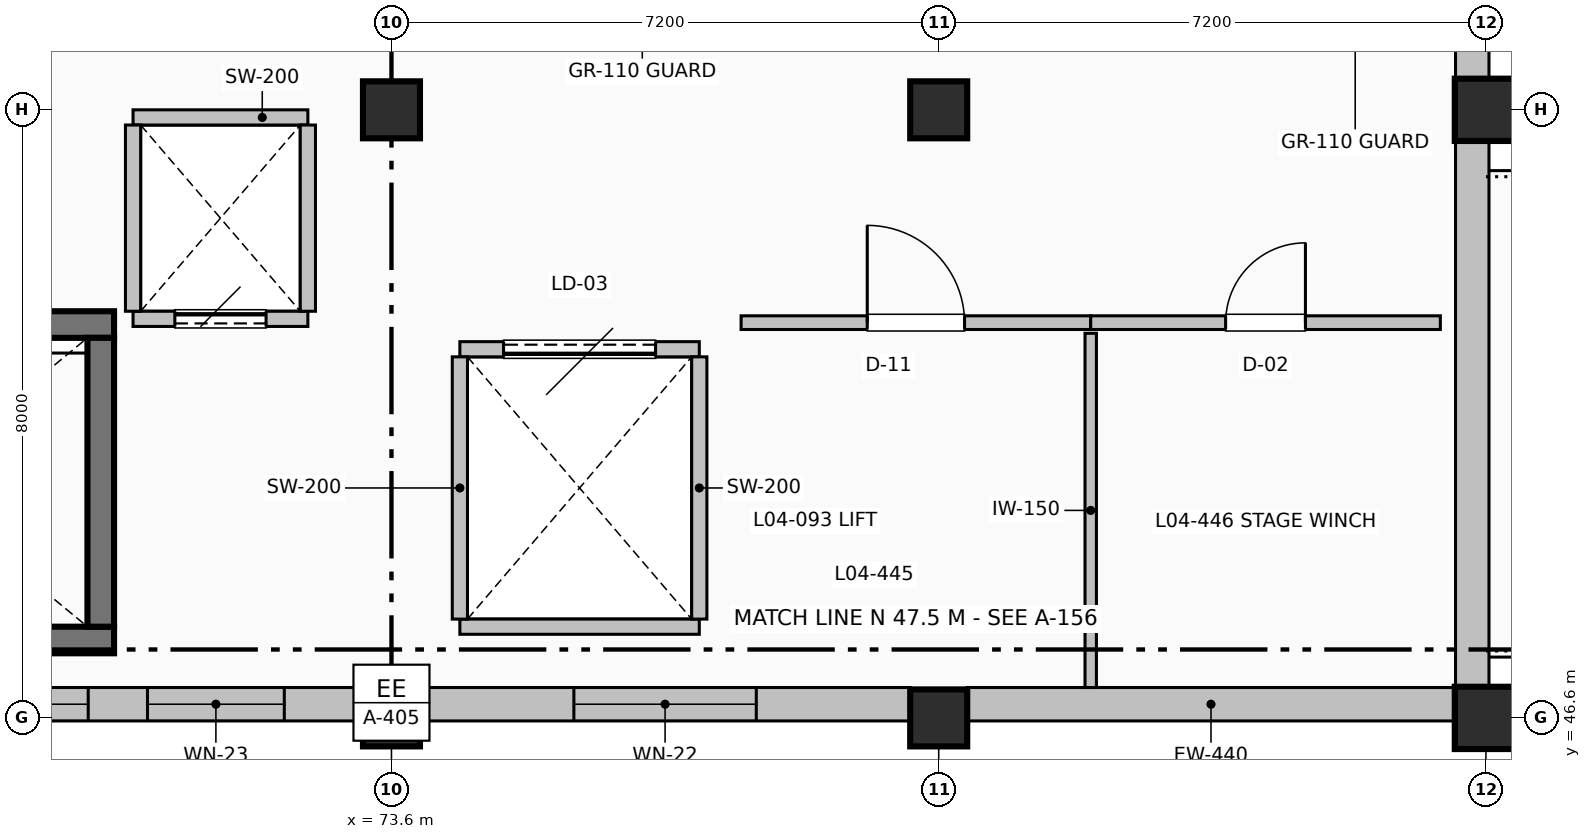
"""IFC4 building model, lengths in metres.
Left out: names, types, materials, properties, quantities, classifications, styles, units other than length and angle.
Written with IfcOpenShell. Run it as: python <this file> out.ifc"""

import sys

from ifc_helpers import new_model, si_unit, direction, frame, frame_2d, origin, origin_2d, place, context, subcontext, project, spatial, rectangle, extrude, element, fill, save


model = new_model("IFC4")
c1 = context("Model", 3, precision=1e-05, world=origin(), true_north=direction((0.0, 1.0)))
c2 = subcontext(c1, "Body", "Model", "MODEL_VIEW")
j1 = project(units=[si_unit("LENGTHUNIT", "METRE"), si_unit("PLANEANGLEUNIT", "RADIAN")], contexts=[c1])
p1 = place(None, origin())
s1 = spatial("IfcSite", under=j1, at=p1, CompositionType="ELEMENT")
p2 = place(p1, origin())
s2 = spatial("IfcBuilding", under=s1, at=p2, CompositionType="ELEMENT")
p3 = place(p2, frame((0.0, 0.0, 19.5)))
s3 = spatial("IfcBuildingStorey", under=s2, at=p3, CompositionType="ELEMENT", Elevation=19.5)
for number, where, z_axis, x_axis in (
    (1, (73.6, 46.6, 0.0), (0.0, 0.0, 1.0), (1.0, 0.0, 0.0)),
    (2, (73.6, 54.6, 0.0), (0.0, 0.0, 1.0), (1.0, 0.0, 0.0)),
    (3, (80.8, 46.6, 0.0), (0.0, 0.0, 1.0), (1.0, 0.0, 0.0)),
    (4, (80.8, 54.6, 0.0), (0.0, 0.0, 1.0), (1.0, 0.0, 0.0)),
):
    element("IfcColumn", number, at=place(p3, frame(where, z_axis=z_axis, x_axis=x_axis)), inside=s3, PredefinedType="COLUMN", context=c2, shape_type="SweptSolid", body=[
        extrude(rectangle(XDim=0.75, YDim=0.75, at=origin_2d()), origin(), (0.0, 0.0, 1.0), 4.5),
    ])
for number, where, z_axis, x_axis in (
    (5, (88.0, 46.6, 0.0), (0.0, 0.0, 1.0), (1.0, 0.0, 0.0)),
    (6, (88.0, 54.6, 0.0), (0.0, 0.0, 1.0), (1.0, 0.0, 0.0)),
):
    element("IfcColumn", number, at=place(p3, frame(where, z_axis=z_axis, x_axis=x_axis)), inside=s3, PredefinedType="COLUMN", context=c2, shape_type="SweptSolid", body=[
        extrude(rectangle(XDim=0.82, YDim=0.82, at=origin_2d()), origin(), (0.0, 0.0, 1.0), 4.5),
    ])
for number, where, z_axis, x_axis in (
    (7, (61.45, 47.625, 0.0), (0.0, 0.0, 1.0), (1.0, 0.0, 0.0)),
    (8, (69.95, 51.775, 0.0), (0.0, 0.0, 1.0), (-1.0, 0.0, 0.0)),
):
    element("IfcWall", number, at=place(p3, frame(where, z_axis=z_axis, x_axis=x_axis)), inside=s3, PredefinedType="SHEAR", context=c2, shape_type="SweptSolid", body=[
        extrude(rectangle(XDim=8.5, YDim=0.35, at=frame_2d((4.25, 0.0))), origin(), (0.0, 0.0, 1.0), 4.22),
    ])
p4 = place(p3, frame((69.775, 51.6, 0.0), z_axis=(0.0, 0.0, 1.0), x_axis=(0.0, -1.0, 0.0)))
e9 = element("IfcWall", 9, at=p4, inside=s3, PredefinedType="SHEAR", context=c2, shape_type="SweptSolid", body=[
    extrude(rectangle(XDim=3.8, YDim=0.35, at=frame_2d((1.9, 0.0))), origin(), (0.0, 0.0, 1.0), 4.22),
])
p5 = place(p3, frame((87.82, 62.09, 0.0), z_axis=(0.0, 0.0, 1.0), x_axis=(0.0, -1.0, 0.0)))
e10 = element("IfcWall", 10, at=p5, inside=s3, PredefinedType="SOLIDWALL", context=c2, shape_type="SweptSolid", body=[
    extrude(rectangle(XDim=7.08, YDim=0.44, at=frame_2d((3.54, 0.0))), origin(), (0.0, 0.0, 1.0), 3.462),
])
p6 = place(p3, frame((87.82, 54.19, 0.0), z_axis=(0.0, 0.0, 1.0), x_axis=(0.0, -1.0, 0.0)))
e11 = element("IfcWall", 11, at=p6, inside=s3, PredefinedType="SOLIDWALL", context=c2, shape_type="SweptSolid", body=[
    extrude(rectangle(XDim=7.18, YDim=0.44, at=frame_2d((3.59, 0.0))), origin(), (0.0, 0.0, 1.0), 3.462),
])
p7 = place(p3, frame((87.59, 46.78, 0.0), z_axis=(0.0, 0.0, 1.0), x_axis=(-1.0, 0.0, 0.0)))
e12 = element("IfcWall", 12, at=p7, inside=s3, PredefinedType="SOLIDWALL", context=c2, shape_type="SweptSolid", body=[
    extrude(rectangle(XDim=6.415, YDim=0.44, at=frame_2d((3.208, 0.0))), origin(), (0.0, 0.0, 1.0), 3.462),
])
p8 = place(p3, frame((80.425, 46.78, 0.0), z_axis=(0.0, 0.0, 1.0), x_axis=(-1.0, 0.0, 0.0)))
e13 = element("IfcWall", 13, at=p8, inside=s3, PredefinedType="SOLIDWALL", context=c2, shape_type="SweptSolid", body=[
    extrude(rectangle(XDim=6.45, YDim=0.44, at=frame_2d((3.225, 0.0))), origin(), (0.0, 0.0, 1.0), 3.462),
])
p9 = place(p8, frame((2.025, 0.0, 1.05)))
e14 = element("IfcOpeningElement", 14, at=p9, cuts=e13, PredefinedType="OPENING", context=c2, shape_type="SweptSolid", body=[
    extrude(rectangle(XDim=2.4, YDim=1.25, at=frame_2d((1.2, 0.625))), frame((0.0, 0.23, 0.0), z_axis=(0.0, -1.0, 0.0), x_axis=(1.0, 0.0, 0.0)), (0.0, 0.0, 1.0), 0.46),
])
p10 = place(p3, frame((73.225, 46.78, 0.0), z_axis=(0.0, 0.0, 1.0), x_axis=(-1.0, 0.0, 0.0)))
e15 = element("IfcWall", 15, at=p10, inside=s3, PredefinedType="SOLIDWALL", context=c2, shape_type="SweptSolid", body=[
    extrude(rectangle(XDim=6.45, YDim=0.44, at=frame_2d((3.225, 0.0))), origin(), (0.0, 0.0, 1.0), 3.462),
])
p11 = place(p10, frame((1.035, 0.0, 1.05)))
e16 = element("IfcOpeningElement", 16, at=p11, cuts=e15, PredefinedType="OPENING", context=c2, shape_type="SweptSolid", body=[
    extrude(rectangle(XDim=1.8, YDim=1.25, at=frame_2d((0.9, 0.625))), frame((0.0, 0.23, 0.0), z_axis=(0.0, -1.0, 0.0), x_axis=(1.0, 0.0, 0.0)), (0.0, 0.0, 1.0), 0.46),
])
p12 = place(p10, frame((3.615, 0.0, 1.05)))
e17 = element("IfcOpeningElement", 17, at=p12, cuts=e15, PredefinedType="OPENING", context=c2, shape_type="SweptSolid", body=[
    extrude(rectangle(XDim=1.8, YDim=1.25, at=frame_2d((0.9, 0.625))), frame((0.0, 0.23, 0.0), z_axis=(0.0, -1.0, 0.0), x_axis=(1.0, 0.0, 0.0)), (0.0, 0.0, 1.0), 0.46),
])
p13 = place(p3, frame((70.2, 51.85, 0.0), z_axis=(0.0, 0.0, 1.0), x_axis=(1.0, 0.0, 0.0)))
e18 = element("IfcWall", 18, at=p13, inside=s3, PredefinedType="PARTITIONING", context=c2, shape_type="SweptSolid", body=[
    extrude(rectangle(XDim=2.3, YDim=0.2, at=frame_2d((1.15, 0.0))), origin(), (0.0, 0.0, 1.0), 4.192),
])
p14 = place(p13, frame((0.55, 0.0, 0.0)))
e19 = element("IfcOpeningElement", 19, at=p14, cuts=e18, PredefinedType="OPENING", context=c2, shape_type="SweptSolid", body=[
    extrude(rectangle(XDim=1.2, YDim=2.15, at=frame_2d((0.6, 1.075))), frame((0.0, 0.11, 0.0), z_axis=(0.0, -1.0, 0.0), x_axis=(1.0, 0.0, 0.0)), (0.0, 0.0, 1.0), 0.22),
])
p15 = place(p3, frame((72.5, 54.5, 0.0), z_axis=(0.0, 0.0, 1.0), x_axis=(-1.0, 0.0, 0.0)))
e20 = element("IfcWall", 20, at=p15, inside=s3, PredefinedType="PARTITIONING", context=c2, shape_type="SweptSolid", body=[
    extrude(rectangle(XDim=2.3, YDim=0.2, at=frame_2d((1.15, 0.0))), origin(), (0.0, 0.0, 1.0), 3.462),
])
for number, where, z_axis, x_axis in (
    (21, (70.2, 51.95, 0.0), (0.0, 0.0, 1.0), (0.0, 1.0, 0.0)),
    (22, (72.5, 54.4, 0.0), (0.0, 0.0, 1.0), (0.0, -1.0, 0.0)),
):
    element("IfcWall", number, at=place(p3, frame(where, z_axis=z_axis, x_axis=x_axis)), inside=s3, PredefinedType="PARTITIONING", context=c2, shape_type="SweptSolid", body=[
        extrude(rectangle(XDim=2.45, YDim=0.2, at=frame_2d((1.225, 0.0))), origin(), (0.0, 0.0, 1.0), 4.192),
    ])
p16 = place(p3, frame((74.5, 47.8, 0.0), z_axis=(0.0, 0.0, 1.0), x_axis=(1.0, 0.0, 0.0)))
e23 = element("IfcWall", 23, at=p16, inside=s3, PredefinedType="PARTITIONING", context=c2, shape_type="SweptSolid", body=[
    extrude(rectangle(XDim=3.15, YDim=0.2, at=frame_2d((1.575, 0.0))), origin(), (0.0, 0.0, 1.0), 4.192),
])
p17 = place(p3, frame((77.65, 51.45, 0.0), z_axis=(0.0, 0.0, 1.0), x_axis=(-1.0, 0.0, 0.0)))
e24 = element("IfcWall", 24, at=p17, inside=s3, PredefinedType="PARTITIONING", context=c2, shape_type="SweptSolid", body=[
    extrude(rectangle(XDim=3.15, YDim=0.2, at=frame_2d((1.575, 0.0))), origin(), (0.0, 0.0, 1.0), 4.192),
])
p18 = place(p17, frame((0.575, 0.0, 0.0)))
e25 = element("IfcOpeningElement", 25, at=p18, cuts=e24, PredefinedType="OPENING", context=c2, shape_type="SweptSolid", body=[
    extrude(rectangle(XDim=2.0, YDim=2.35, at=frame_2d((1.0, 1.175))), frame((0.0, 0.11, 0.0), z_axis=(0.0, -1.0, 0.0), x_axis=(1.0, 0.0, 0.0)), (0.0, 0.0, 1.0), 0.22),
])
for number, where, z_axis, x_axis in (
    (26, (74.5, 47.9, 0.0), (0.0, 0.0, 1.0), (0.0, 1.0, 0.0)),
    (27, (77.65, 51.35, 0.0), (0.0, 0.0, 1.0), (0.0, -1.0, 0.0)),
):
    element("IfcWall", number, at=place(p3, frame(where, z_axis=z_axis, x_axis=x_axis)), inside=s3, PredefinedType="PARTITIONING", context=c2, shape_type="SweptSolid", body=[
        extrude(rectangle(XDim=3.45, YDim=0.2, at=frame_2d((1.725, 0.0))), origin(), (0.0, 0.0, 1.0), 4.192),
    ])
p19 = place(p3, frame((78.2, 51.8, 0.0), z_axis=(0.0, 0.0, 1.0), x_axis=(1.0, 0.0, 0.0)))
e28 = element("IfcWall", 28, at=p19, inside=s3, PredefinedType="PARTITIONING", context=c2, shape_type="SweptSolid", body=[
    extrude(rectangle(XDim=4.6, YDim=0.18, at=frame_2d((2.3, 0.0))), origin(), (0.0, 0.0, 1.0), 4.192),
])
p20 = place(p19, frame((1.66, 0.0, 0.0)))
e29 = element("IfcOpeningElement", 29, at=p20, cuts=e28, PredefinedType="OPENING", context=c2, shape_type="SweptSolid", body=[
    extrude(rectangle(XDim=1.28, YDim=2.14, at=frame_2d((0.64, 1.07))), frame((0.0, 0.1, 0.0), z_axis=(0.0, -1.0, 0.0), x_axis=(1.0, 0.0, 0.0)), (0.0, 0.0, 1.0), 0.2),
])
p21 = place(p3, frame((82.8, 47.0, 0.0), z_axis=(0.0, 0.0, 1.0), x_axis=(0.0, 1.0, 0.0)))
e30 = element("IfcWall", 30, at=p21, inside=s3, PredefinedType="PARTITIONING", context=c2, shape_type="SweptSolid", body=[
    extrude(rectangle(XDim=4.66, YDim=0.15, at=frame_2d((2.33, 0.0))), origin(), (0.0, 0.0, 1.0), 4.192),
])
p22 = place(p3, frame((82.8, 51.8, 0.0), z_axis=(0.0, 0.0, 1.0), x_axis=(1.0, 0.0, 0.0)))
e31 = element("IfcWall", 31, at=p22, inside=s3, PredefinedType="PARTITIONING", context=c2, shape_type="SweptSolid", body=[
    extrude(rectangle(XDim=4.6, YDim=0.18, at=frame_2d((2.3, 0.0))), origin(), (0.0, 0.0, 1.0), 4.192),
])
p23 = place(p22, frame((1.775, 0.0, 0.0)))
e32 = element("IfcOpeningElement", 32, at=p23, cuts=e31, PredefinedType="OPENING", context=c2, shape_type="SweptSolid", body=[
    extrude(rectangle(XDim=1.05, YDim=2.1, at=frame_2d((0.525, 1.05))), frame((0.0, 0.1, 0.0), z_axis=(0.0, -1.0, 0.0), x_axis=(1.0, 0.0, 0.0)), (0.0, 0.0, 1.0), 0.2),
])
p24 = place(p9, origin())
e33 = element("IfcWindow", 33, at=p24, inside=s3, PartitioningType="SINGLE_PANEL", PredefinedType="WINDOW", context=c2, shape_type="SweptSolid", body=[
    extrude(rectangle(XDim=2.4, YDim=1.25, at=frame_2d((1.2, 0.625))), frame((0.0, 0.03, 0.0), z_axis=(0.0, -1.0, 0.0), x_axis=(1.0, 0.0, 0.0)), (0.0, 0.0, 1.0), 0.06),
])
fill(e14, e33)
p25 = place(p11, origin())
e34 = element("IfcWindow", 34, at=p25, inside=s3, PartitioningType="SINGLE_PANEL", PredefinedType="WINDOW", context=c2, shape_type="SweptSolid", body=[
    extrude(rectangle(XDim=1.8, YDim=1.25, at=frame_2d((0.9, 0.625))), frame((0.0, 0.03, 0.0), z_axis=(0.0, -1.0, 0.0), x_axis=(1.0, 0.0, 0.0)), (0.0, 0.0, 1.0), 0.06),
])
fill(e16, e34)
p26 = place(p12, origin())
e35 = element("IfcWindow", 35, at=p26, inside=s3, PartitioningType="SINGLE_PANEL", PredefinedType="WINDOW", context=c2, shape_type="SweptSolid", body=[
    extrude(rectangle(XDim=1.8, YDim=1.25, at=frame_2d((0.9, 0.625))), frame((0.0, 0.03, 0.0), z_axis=(0.0, -1.0, 0.0), x_axis=(1.0, 0.0, 0.0)), (0.0, 0.0, 1.0), 0.06),
])
fill(e17, e35)
p27 = place(p14, origin())
e36 = element("IfcDoor", 36, at=p27, inside=s3, OperationType="SLIDING_TO_LEFT", PredefinedType="DOOR", context=c2, shape_type="SweptSolid", body=[
    extrude(rectangle(XDim=1.2, YDim=2.15, at=frame_2d((0.6, 1.075))), frame((0.0, 0.025, 0.0), z_axis=(0.0, -1.0, 0.0), x_axis=(1.0, 0.0, 0.0)), (0.0, 0.0, 1.0), 0.05),
])
fill(e19, e36)
p28 = place(p18, origin())
e37 = element("IfcDoor", 37, at=p28, inside=s3, OperationType="SLIDING_TO_LEFT", PredefinedType="DOOR", context=c2, shape_type="SweptSolid", body=[
    extrude(rectangle(XDim=2.0, YDim=2.35, at=frame_2d((1.0, 1.175))), frame((0.0, 0.025, 0.0), z_axis=(0.0, -1.0, 0.0), x_axis=(1.0, 0.0, 0.0)), (0.0, 0.0, 1.0), 0.05),
])
fill(e25, e37)
p29 = place(p20, origin())
e38 = element("IfcDoor", 38, at=p29, inside=s3, OperationType="SINGLE_SWING_LEFT", PredefinedType="DOOR", context=c2, shape_type="SweptSolid", body=[
    extrude(rectangle(XDim=1.28, YDim=2.14, at=frame_2d((0.64, 1.07))), frame((0.0, 0.025, 0.0), z_axis=(0.0, -1.0, 0.0), x_axis=(1.0, 0.0, 0.0)), (0.0, 0.0, 1.0), 0.05),
])
fill(e29, e38)
p30 = place(p23, origin())
e39 = element("IfcDoor", 39, at=p30, inside=s3, OperationType="SINGLE_SWING_RIGHT", PredefinedType="DOOR", context=c2, shape_type="SweptSolid", body=[
    extrude(rectangle(XDim=1.05, YDim=2.1, at=frame_2d((0.525, 1.05))), frame((0.0, 0.025, 0.0), z_axis=(0.0, -1.0, 0.0), x_axis=(1.0, 0.0, 0.0)), (0.0, 0.0, 1.0), 0.05),
])
fill(e32, e39)
save(model, sys.argv[1])
